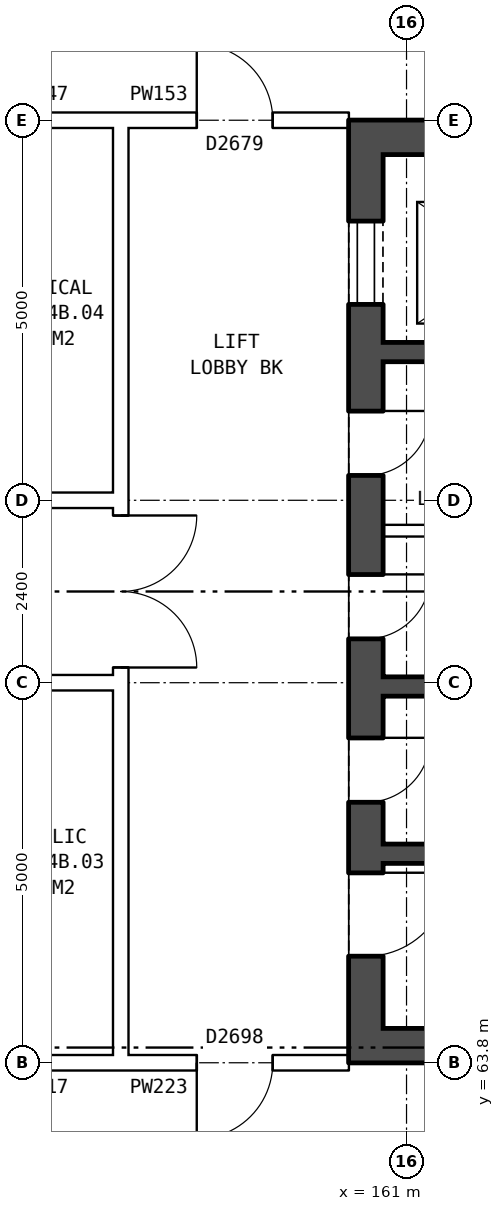
"""IFC4 building model, lengths in metres.
Left out: names, types, materials, properties, quantities, classifications, styles, units other than length and angle.
Written with IfcOpenShell. Run it as: python <this file> out.ifc"""

import sys

from ifc_helpers import new_model, si_unit, direction, frame, frame_2d, origin, place, context, subcontext, project, spatial, rectangle, extrude, element, fill, save


model = new_model("IFC4")
c1 = context("Model", 3, precision=1e-05, world=origin(), true_north=direction((0.0, 1.0)))
c2 = subcontext(c1, "Body", "Model", "MODEL_VIEW")
j1 = project(units=[si_unit("LENGTHUNIT", "METRE"), si_unit("PLANEANGLEUNIT", "RADIAN")], contexts=[c1])
p1 = place(None, origin())
s1 = spatial("IfcSite", under=j1, at=p1, CompositionType="ELEMENT")
p2 = place(p1, origin())
s2 = spatial("IfcBuilding", under=s1, at=p2, CompositionType="ELEMENT")
p3 = place(p2, frame((0.0, 0.0, 191.3)))
s3 = spatial("IfcBuildingStorey", under=s2, at=p3, CompositionType="ELEMENT", Elevation=191.3)
p4 = place(p3, frame((160.465, 76.2, 0.0), z_axis=(0.0, 0.0, 1.0), x_axis=(0.0, -1.0, 0.0)))
e1 = element("IfcWall", 1, at=p4, inside=s3, PredefinedType="SHEAR", context=c2, shape_type="SweptSolid", body=[
    extrude(rectangle(XDim=12.4, YDim=0.45, at=frame_2d((6.2, 0.0))), origin(), (0.0, 0.0, 1.0), 2.85),
])
p5 = place(p4, frame((1.325, 0.0, 0.0)))
e2 = element("IfcOpeningElement", 2, at=p5, cuts=e1, PredefinedType="OPENING", context=c2, shape_type="SweptSolid", body=[
    extrude(rectangle(XDim=1.1, YDim=2.1, at=frame_2d((0.55, 1.05))), frame((0.0, 0.235, 0.0), z_axis=(0.0, -1.0, 0.0), x_axis=(1.0, 0.0, 0.0)), (0.0, 0.0, 1.0), 0.47),
])
p6 = place(p4, frame((3.825, 0.0, 0.0)))
e3 = element("IfcOpeningElement", 3, at=p6, cuts=e1, PredefinedType="OPENING", context=c2, shape_type="SweptSolid", body=[
    extrude(rectangle(XDim=0.85, YDim=2.1, at=frame_2d((0.425, 1.05))), frame((0.0, 0.235, 0.0), z_axis=(0.0, -1.0, 0.0), x_axis=(1.0, 0.0, 0.0)), (0.0, 0.0, 1.0), 0.47),
])
p7 = place(p4, frame((5.975, 0.0, 0.0)))
e4 = element("IfcOpeningElement", 4, at=p7, cuts=e1, PredefinedType="OPENING", context=c2, shape_type="SweptSolid", body=[
    extrude(rectangle(XDim=0.85, YDim=2.1, at=frame_2d((0.425, 1.05))), frame((0.0, 0.235, 0.0), z_axis=(0.0, -1.0, 0.0), x_axis=(1.0, 0.0, 0.0)), (0.0, 0.0, 1.0), 0.47),
])
p8 = place(p4, frame((9.9, 0.0, 0.0)))
e5 = element("IfcOpeningElement", 5, at=p8, cuts=e1, PredefinedType="OPENING", context=c2, shape_type="SweptSolid", body=[
    extrude(rectangle(XDim=1.1, YDim=2.1, at=frame_2d((0.55, 1.05))), frame((0.0, 0.235, 0.0), z_axis=(0.0, -1.0, 0.0), x_axis=(1.0, 0.0, 0.0)), (0.0, 0.0, 1.0), 0.47),
])
p9 = place(p4, frame((8.125, 0.0, 0.0)))
e6 = element("IfcOpeningElement", 6, at=p9, cuts=e1, PredefinedType="OPENING", context=c2, shape_type="SweptSolid", body=[
    extrude(rectangle(XDim=0.85, YDim=2.1, at=frame_2d((0.425, 1.05))), frame((0.0, 0.235, 0.0), z_axis=(0.0, -1.0, 0.0), x_axis=(1.0, 0.0, 0.0)), (0.0, 0.0, 1.0), 0.47),
])
for number, where, z_axis, x_axis in (
    (7, (160.69, 75.975, 0.0), (0.0, 0.0, 1.0), (1.0, 0.0, 0.0)),
    (8, (160.69, 64.025, 0.0), (0.0, 0.0, 1.0), (1.0, 0.0, 0.0)),
):
    element("IfcWall", number, at=place(p3, frame(where, z_axis=z_axis, x_axis=x_axis)), inside=s3, PredefinedType="SHEAR", context=c2, shape_type="SweptSolid", body=[
        extrude(rectangle(XDim=7.5, YDim=0.45, at=frame_2d((3.75, 0.0))), origin(), (0.0, 0.0, 1.0), 2.85),
    ])
p10 = place(p3, frame((160.69, 73.15, 0.0), z_axis=(0.0, 0.0, 1.0), x_axis=(1.0, 0.0, 0.0)))
e9 = element("IfcWall", 9, at=p10, inside=s3, PredefinedType="SHEAR", context=c2, shape_type="SweptSolid", body=[
    extrude(rectangle(XDim=4.675, YDim=0.25, at=frame_2d((2.337, 0.0))), origin(), (0.0, 0.0, 1.0), 2.85),
])
p11 = place(p3, frame((160.69, 70.8, 0.0), z_axis=(0.0, 0.0, 1.0), x_axis=(1.0, 0.0, 0.0)))
e10 = element("IfcWall", 10, at=p11, inside=s3, PredefinedType="PARTITIONING", context=c2, shape_type="SweptSolid", body=[
    extrude(rectangle(XDim=2.475, YDim=0.15, at=frame_2d((1.238, 0.0))), origin(), (0.0, 0.0, 1.0), 2.85),
])
p12 = place(p3, frame((160.69, 68.75, 0.0), z_axis=(0.0, 0.0, 1.0), x_axis=(1.0, 0.0, 0.0)))
e11 = element("IfcWall", 11, at=p12, inside=s3, PredefinedType="SHEAR", context=c2, shape_type="SweptSolid", body=[
    extrude(rectangle(XDim=7.5, YDim=0.25, at=frame_2d((3.75, 0.0))), origin(), (0.0, 0.0, 1.0), 2.85),
])
p13 = place(p12, frame((5.075, 0.0, 0.0)))
e12 = element("IfcOpeningElement", 12, at=p13, cuts=e11, PredefinedType="OPENING", context=c2, shape_type="SweptSolid", body=[
    extrude(rectangle(XDim=1.1, YDim=2.1, at=frame_2d((0.55, 1.05))), frame((0.0, 0.135, 0.0), z_axis=(0.0, -1.0, 0.0), x_axis=(1.0, 0.0, 0.0)), (0.0, 0.0, 1.0), 0.27),
])
p14 = place(p12, frame((3.275, 0.0, 0.0)))
e13 = element("IfcOpeningElement", 13, at=p14, cuts=e11, PredefinedType="OPENING", context=c2, shape_type="SweptSolid", body=[
    extrude(rectangle(XDim=0.85, YDim=2.1, at=frame_2d((0.425, 1.05))), frame((0.0, 0.135, 0.0), z_axis=(0.0, -1.0, 0.0), x_axis=(1.0, 0.0, 0.0)), (0.0, 0.0, 1.0), 0.27),
])
p15 = place(p3, frame((160.69, 66.55, 0.0), z_axis=(0.0, 0.0, 1.0), x_axis=(1.0, 0.0, 0.0)))
e14 = element("IfcWall", 14, at=p15, inside=s3, PredefinedType="SHEAR", context=c2, shape_type="SweptSolid", body=[
    extrude(rectangle(XDim=2.475, YDim=0.25, at=frame_2d((1.238, 0.0))), origin(), (0.0, 0.0, 1.0), 2.85),
])
p16 = place(p3, frame((157.24, 63.9, 0.0), z_axis=(0.0, 0.0, 1.0), x_axis=(0.0, 1.0, 0.0)))
e15 = element("IfcWall", 15, at=p16, inside=s3, PredefinedType="PARTITIONING", context=c2, shape_type="SweptSolid", body=[
    extrude(rectangle(XDim=12.2, YDim=0.2, at=frame_2d((6.1, 0.0))), origin(), (0.0, 0.0, 1.0), 2.85),
])
p17 = place(p16, frame((5.1, 0.0, 0.0)))
e16 = element("IfcOpeningElement", 16, at=p17, cuts=e15, PredefinedType="OPENING", context=c2, shape_type="SweptSolid", body=[
    extrude(rectangle(XDim=2.0, YDim=2.1, at=frame_2d((1.0, 1.05))), frame((0.0, 0.11, 0.0), z_axis=(0.0, -1.0, 0.0), x_axis=(1.0, 0.0, 0.0)), (0.0, 0.0, 1.0), 0.22),
])
p18 = place(p3, frame((155.1, 63.8, 0.0), z_axis=(0.0, 0.0, 1.0), x_axis=(1.0, 0.0, 0.0)))
e17 = element("IfcWall", 17, at=p18, inside=s3, PredefinedType="PARTITIONING", context=c2, shape_type="SweptSolid", body=[
    extrude(rectangle(XDim=2.14, YDim=0.2, at=frame_2d((1.07, 0.0))), origin(), (0.0, 0.0, 1.0), 2.85),
])
p19 = place(p3, frame((157.24, 63.8, 0.0), z_axis=(0.0, 0.0, 1.0), x_axis=(1.0, 0.0, 0.0)))
e18 = element("IfcWall", 18, at=p19, inside=s3, PredefinedType="PARTITIONING", context=c2, shape_type="SweptSolid", body=[
    extrude(rectangle(XDim=3.0, YDim=0.2, at=frame_2d((1.5, 0.0))), origin(), (0.0, 0.0, 1.0), 2.85),
])
p20 = place(p19, frame((1.0, 0.0, 0.0)))
e19 = element("IfcOpeningElement", 19, at=p20, cuts=e18, PredefinedType="OPENING", context=c2, shape_type="SweptSolid", body=[
    extrude(rectangle(XDim=1.0, YDim=2.1, at=frame_2d((0.5, 1.05))), frame((0.0, 0.11, 0.0), z_axis=(0.0, -1.0, 0.0), x_axis=(1.0, 0.0, 0.0)), (0.0, 0.0, 1.0), 0.22),
])
p21 = place(p3, frame((142.76, 68.8, 0.0), z_axis=(0.0, 0.0, 1.0), x_axis=(1.0, 0.0, 0.0)))
e20 = element("IfcWall", 20, at=p21, inside=s3, PredefinedType="PARTITIONING", context=c2, shape_type="SweptSolid", body=[
    extrude(rectangle(XDim=14.48, YDim=0.2, at=frame_2d((7.24, 0.0))), origin(), (0.0, 0.0, 1.0), 2.85),
])
p22 = place(p21, frame((1.12, 0.0, 0.0)))
e21 = element("IfcOpeningElement", 21, at=p22, cuts=e20, PredefinedType="OPENING", context=c2, shape_type="SweptSolid", body=[
    extrude(rectangle(XDim=1.0, YDim=2.1, at=frame_2d((0.5, 1.05))), frame((0.0, 0.11, 0.0), z_axis=(0.0, -1.0, 0.0), x_axis=(1.0, 0.0, 0.0)), (0.0, 0.0, 1.0), 0.22),
])
p23 = place(p21, frame((7.24, 0.0, 0.0)))
e22 = element("IfcOpeningElement", 22, at=p23, cuts=e20, PredefinedType="OPENING", context=c2, shape_type="SweptSolid", body=[
    extrude(rectangle(XDim=1.0, YDim=2.1, at=frame_2d((0.5, 1.05))), frame((0.0, 0.11, 0.0), z_axis=(0.0, -1.0, 0.0), x_axis=(1.0, 0.0, 0.0)), (0.0, 0.0, 1.0), 0.22),
])
p24 = place(p3, frame((142.76, 71.2, 0.0), z_axis=(0.0, 0.0, 1.0), x_axis=(1.0, 0.0, 0.0)))
e23 = element("IfcWall", 23, at=p24, inside=s3, PredefinedType="PARTITIONING", context=c2, shape_type="SweptSolid", body=[
    extrude(rectangle(XDim=14.48, YDim=0.2, at=frame_2d((7.24, 0.0))), origin(), (0.0, 0.0, 1.0), 2.85),
])
p25 = place(p24, frame((4.24, 0.0, 0.0)))
e24 = element("IfcOpeningElement", 24, at=p25, cuts=e23, PredefinedType="OPENING", context=c2, shape_type="SweptSolid", body=[
    extrude(rectangle(XDim=1.0, YDim=2.1, at=frame_2d((0.5, 1.05))), frame((0.0, 0.11, 0.0), z_axis=(0.0, -1.0, 0.0), x_axis=(1.0, 0.0, 0.0)), (0.0, 0.0, 1.0), 0.22),
])
p26 = place(p24, frame((7.24, 0.0, 0.0)))
e25 = element("IfcOpeningElement", 25, at=p26, cuts=e23, PredefinedType="OPENING", context=c2, shape_type="SweptSolid", body=[
    extrude(rectangle(XDim=1.0, YDim=2.1, at=frame_2d((0.5, 1.05))), frame((0.0, 0.11, 0.0), z_axis=(0.0, -1.0, 0.0), x_axis=(1.0, 0.0, 0.0)), (0.0, 0.0, 1.0), 0.22),
])
p27 = place(p3, frame((155.1, 76.2, 0.0), z_axis=(0.0, 0.0, 1.0), x_axis=(1.0, 0.0, 0.0)))
e26 = element("IfcWall", 26, at=p27, inside=s3, PredefinedType="PARTITIONING", context=c2, shape_type="SweptSolid", body=[
    extrude(rectangle(XDim=2.14, YDim=0.2, at=frame_2d((1.07, 0.0))), origin(), (0.0, 0.0, 1.0), 2.85),
])
p28 = place(p3, frame((157.24, 76.2, 0.0), z_axis=(0.0, 0.0, 1.0), x_axis=(1.0, 0.0, 0.0)))
e27 = element("IfcWall", 27, at=p28, inside=s3, PredefinedType="PARTITIONING", context=c2, shape_type="SweptSolid", body=[
    extrude(rectangle(XDim=3.0, YDim=0.2, at=frame_2d((1.5, 0.0))), origin(), (0.0, 0.0, 1.0), 2.85),
])
p29 = place(p28, frame((1.0, 0.0, 0.0)))
e28 = element("IfcOpeningElement", 28, at=p29, cuts=e27, PredefinedType="OPENING", context=c2, shape_type="SweptSolid", body=[
    extrude(rectangle(XDim=1.0, YDim=2.1, at=frame_2d((0.5, 1.05))), frame((0.0, 0.11, 0.0), z_axis=(0.0, -1.0, 0.0), x_axis=(1.0, 0.0, 0.0)), (0.0, 0.0, 1.0), 0.22),
])
p30 = place(p5, origin())
e29 = element("IfcDoor", 29, at=p30, inside=s3, OperationType="DOUBLE_DOOR_SLIDING", PredefinedType="DOOR", context=c2, shape_type="SweptSolid", body=[
    extrude(rectangle(XDim=1.1, YDim=2.1, at=frame_2d((0.55, 1.05))), frame((0.0, 0.21, 0.0), z_axis=(0.0, -1.0, 0.0), x_axis=(1.0, 0.0, 0.0)), (0.0, 0.0, 1.0), 0.05),
])
fill(e2, e29)
p31 = place(p6, origin())
e30 = element("IfcDoor", 30, at=p31, inside=s3, OperationType="SINGLE_SWING_LEFT", PredefinedType="DOOR", context=c2, shape_type="SweptSolid", body=[
    extrude(rectangle(XDim=0.85, YDim=2.1, at=frame_2d((0.425, 1.05))), frame((0.0, 0.21, 0.0), z_axis=(0.0, -1.0, 0.0), x_axis=(1.0, 0.0, 0.0)), (0.0, 0.0, 1.0), 0.05),
])
fill(e3, e30)
p32 = place(p7, origin())
e31 = element("IfcDoor", 31, at=p32, inside=s3, OperationType="SINGLE_SWING_LEFT", PredefinedType="DOOR", context=c2, shape_type="SweptSolid", body=[
    extrude(rectangle(XDim=0.85, YDim=2.1, at=frame_2d((0.425, 1.05))), frame((0.0, 0.21, 0.0), z_axis=(0.0, -1.0, 0.0), x_axis=(1.0, 0.0, 0.0)), (0.0, 0.0, 1.0), 0.05),
])
fill(e4, e31)
p33 = place(p8, origin())
e32 = element("IfcDoor", 32, at=p33, inside=s3, OperationType="SINGLE_SWING_LEFT", PredefinedType="DOOR", context=c2, shape_type="SweptSolid", body=[
    extrude(rectangle(XDim=1.1, YDim=2.1, at=frame_2d((0.55, 1.05))), frame((0.0, 0.21, 0.0), z_axis=(0.0, -1.0, 0.0), x_axis=(1.0, 0.0, 0.0)), (0.0, 0.0, 1.0), 0.05),
])
fill(e5, e32)
p34 = place(p9, origin())
e33 = element("IfcDoor", 33, at=p34, inside=s3, OperationType="SINGLE_SWING_LEFT", PredefinedType="DOOR", context=c2, shape_type="SweptSolid", body=[
    extrude(rectangle(XDim=0.85, YDim=2.1, at=frame_2d((0.425, 1.05))), frame((0.0, 0.21, 0.0), z_axis=(0.0, -1.0, 0.0), x_axis=(1.0, 0.0, 0.0)), (0.0, 0.0, 1.0), 0.05),
])
fill(e6, e33)
p35 = place(p17, frame((2.0, 0.0, 0.0), z_axis=(0.0, 0.0, 1.0), x_axis=(-1.0, 0.0, 0.0)))
e34 = element("IfcDoor", 34, at=p35, inside=s3, OperationType="DOUBLE_DOOR_SINGLE_SWING", PredefinedType="DOOR", context=c2, shape_type="SweptSolid", body=[
    extrude(rectangle(XDim=2.0, YDim=2.1, at=frame_2d((1.0, 1.05))), frame((0.0, 0.025, 0.0), z_axis=(0.0, -1.0, 0.0), x_axis=(1.0, 0.0, 0.0)), (0.0, 0.0, 1.0), 0.05),
])
fill(e16, e34)
p36 = place(p20, frame((1.0, 0.0, 0.0), z_axis=(0.0, 0.0, 1.0), x_axis=(-1.0, 0.0, 0.0)))
e35 = element("IfcDoor", 35, at=p36, inside=s3, OperationType="SINGLE_SWING_RIGHT", PredefinedType="DOOR", context=c2, shape_type="SweptSolid", body=[
    extrude(rectangle(XDim=1.0, YDim=2.1, at=frame_2d((0.5, 1.05))), frame((0.0, 0.025, 0.0), z_axis=(0.0, -1.0, 0.0), x_axis=(1.0, 0.0, 0.0)), (0.0, 0.0, 1.0), 0.05),
])
fill(e19, e35)
p37 = place(p29, origin())
e36 = element("IfcDoor", 36, at=p37, inside=s3, OperationType="SINGLE_SWING_LEFT", PredefinedType="DOOR", context=c2, shape_type="SweptSolid", body=[
    extrude(rectangle(XDim=1.0, YDim=2.1, at=frame_2d((0.5, 1.05))), frame((0.0, 0.025, 0.0), z_axis=(0.0, -1.0, 0.0), x_axis=(1.0, 0.0, 0.0)), (0.0, 0.0, 1.0), 0.05),
])
fill(e28, e36)
save(model, sys.argv[1])
